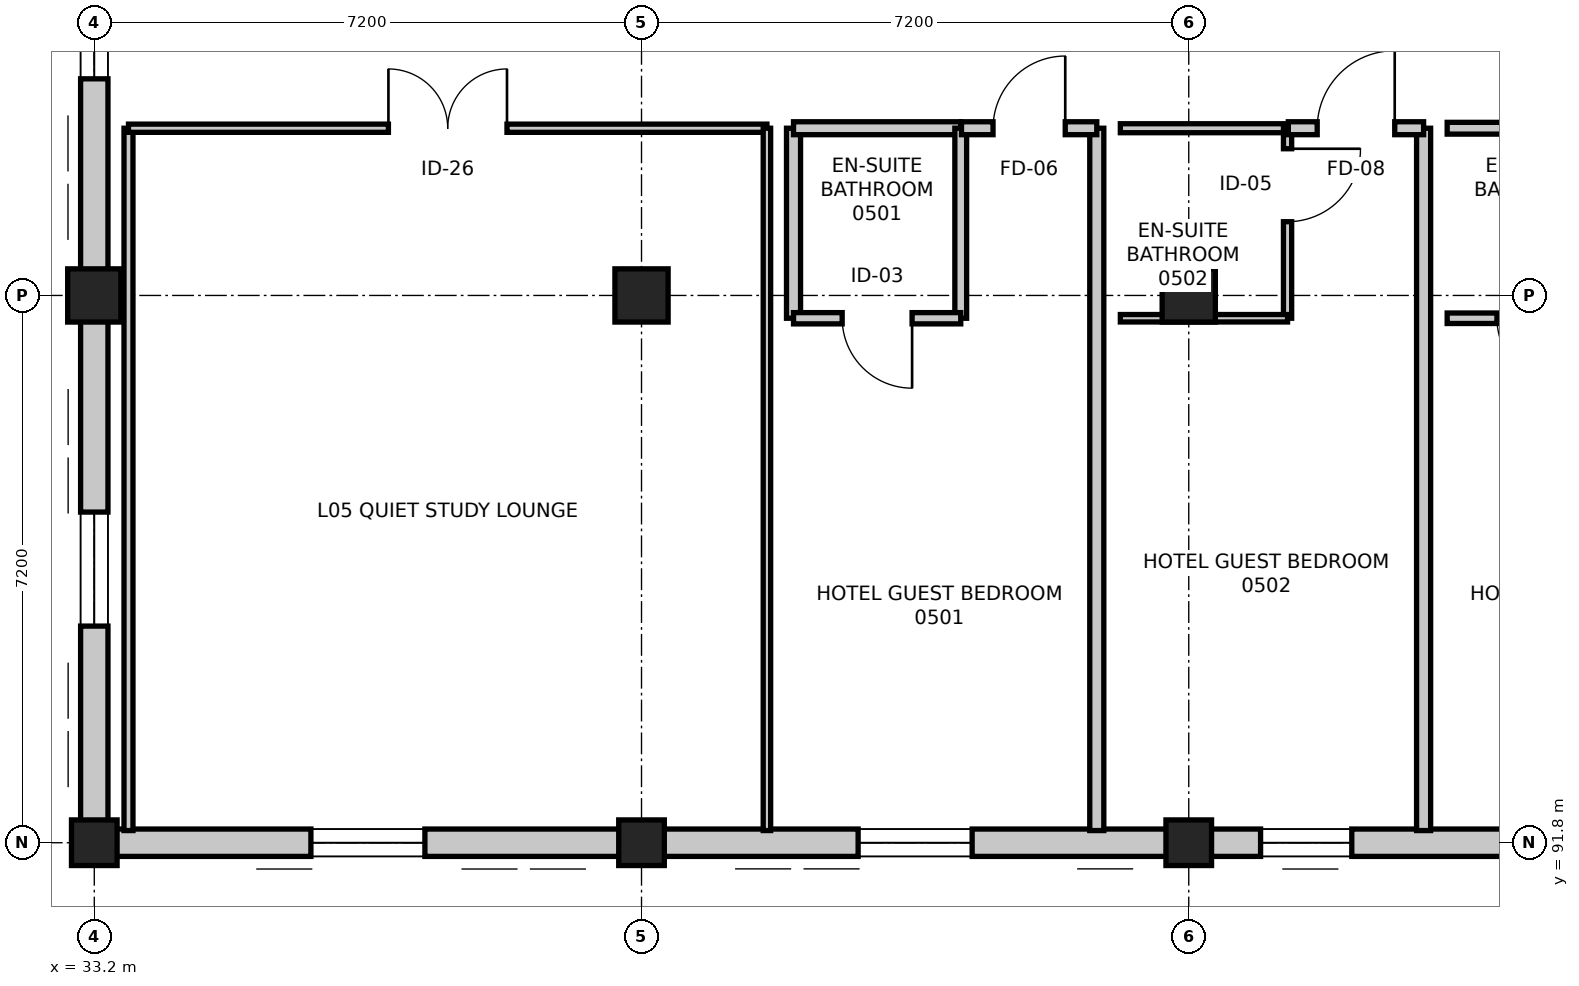
"""IFC4 building model, lengths in metres.
Left out: names, types, materials, properties, quantities, classifications, styles, units other than length and angle.
Written with IfcOpenShell. Run it as: python <this file> out.ifc"""

import sys

from ifc_helpers import new_model, si_unit, direction, frame, frame_2d, origin, origin_2d, place, context, subcontext, project, spatial, rectangle, extrude, element, fill, save


model = new_model("IFC4")
c1 = context("Model", 3, precision=1e-05, world=origin(), true_north=direction((0.0, 1.0)))
c2 = subcontext(c1, "Body", "Model", "MODEL_VIEW")
j1 = project(units=[si_unit("LENGTHUNIT", "METRE"), si_unit("PLANEANGLEUNIT", "RADIAN")], contexts=[c1])
p1 = place(None, origin())
s1 = spatial("IfcSite", under=j1, at=p1, CompositionType="ELEMENT")
p2 = place(p1, origin())
s2 = spatial("IfcBuilding", under=s1, at=p2, CompositionType="ELEMENT")
p3 = place(p2, frame((0.0, 0.0, 22.8)))
s3 = spatial("IfcBuildingStorey", under=s2, at=p3, CompositionType="ELEMENT", Elevation=22.8)
p4 = place(p3, frame((33.2, 91.8, 0.0), z_axis=(0.0, 0.0, 1.0), x_axis=(1.0, 0.0, 0.0)))
e1 = element("IfcColumn", 1, at=p4, inside=s3, PredefinedType="COLUMN", context=c2, shape_type="SweptSolid", body=[
    extrude(rectangle(XDim=0.6, YDim=0.6, at=origin_2d()), origin(), (0.0, 0.0, 1.0), 3.6),
])
p5 = place(p3, frame((33.2, 99.0, 0.0), z_axis=(0.0, 0.0, 1.0), x_axis=(1.0, 0.0, 0.0)))
e2 = element("IfcColumn", 2, at=p5, inside=s3, PredefinedType="COLUMN", context=c2, shape_type="SweptSolid", body=[
    extrude(rectangle(XDim=0.7, YDim=0.7, at=origin_2d()), origin(), (0.0, 0.0, 1.0), 3.6),
])
p6 = place(p3, frame((40.4, 91.8, 0.0), z_axis=(0.0, 0.0, 1.0), x_axis=(1.0, 0.0, 0.0)))
e3 = element("IfcColumn", 3, at=p6, inside=s3, PredefinedType="COLUMN", context=c2, shape_type="SweptSolid", body=[
    extrude(rectangle(XDim=0.6, YDim=0.6, at=origin_2d()), origin(), (0.0, 0.0, 1.0), 3.6),
])
p7 = place(p3, frame((40.4, 99.0, 0.0), z_axis=(0.0, 0.0, 1.0), x_axis=(1.0, 0.0, 0.0)))
e4 = element("IfcColumn", 4, at=p7, inside=s3, PredefinedType="COLUMN", context=c2, shape_type="SweptSolid", body=[
    extrude(rectangle(XDim=0.7, YDim=0.7, at=origin_2d()), origin(), (0.0, 0.0, 1.0), 3.6),
])
p8 = place(p3, frame((47.6, 91.8, 0.0), z_axis=(0.0, 0.0, 1.0), x_axis=(1.0, 0.0, 0.0)))
e5 = element("IfcColumn", 5, at=p8, inside=s3, PredefinedType="COLUMN", context=c2, shape_type="SweptSolid", body=[
    extrude(rectangle(XDim=0.6, YDim=0.6, at=origin_2d()), origin(), (0.0, 0.0, 1.0), 3.6),
])
p9 = place(p3, frame((47.6, 99.0, 0.0), z_axis=(0.0, 0.0, 1.0), x_axis=(1.0, 0.0, 0.0)))
e6 = element("IfcColumn", 6, at=p9, inside=s3, PredefinedType="COLUMN", context=c2, shape_type="SweptSolid", body=[
    extrude(rectangle(XDim=0.7, YDim=0.7, at=origin_2d()), origin(), (0.0, 0.0, 1.0), 3.6),
])
p10 = place(p3, frame((54.8, 91.8, 0.0), z_axis=(0.0, 0.0, 1.0), x_axis=(-1.0, 0.0, 0.0)))
e7 = element("IfcWall", 7, at=p10, inside=s3, PredefinedType="STANDARD", context=c2, shape_type="SweptSolid", body=[
    extrude(rectangle(XDim=7.2, YDim=0.36, at=frame_2d((3.6, 0.0))), origin(), (0.0, 0.0, 1.0), 2.735),
])
p11 = place(p10, frame((1.455, 0.0, 0.75)))
e8 = element("IfcOpeningElement", 8, at=p11, cuts=e7, PredefinedType="OPENING", context=c2, shape_type="SweptSolid", body=[
    extrude(rectangle(XDim=1.2, YDim=1.5, at=frame_2d((0.6, 0.75))), frame((0.0, 0.19, 0.0), z_axis=(0.0, -1.0, 0.0), x_axis=(1.0, 0.0, 0.0)), (0.0, 0.0, 1.0), 0.38),
])
p12 = place(p10, frame((5.055, 0.0, 0.75)))
e9 = element("IfcOpeningElement", 9, at=p12, cuts=e7, PredefinedType="OPENING", context=c2, shape_type="SweptSolid", body=[
    extrude(rectangle(XDim=1.2, YDim=1.5, at=frame_2d((0.6, 0.75))), frame((0.0, 0.19, 0.0), z_axis=(0.0, -1.0, 0.0), x_axis=(1.0, 0.0, 0.0)), (0.0, 0.0, 1.0), 0.38),
])
p13 = place(p3, frame((47.6, 91.8, 0.0), z_axis=(0.0, 0.0, 1.0), x_axis=(-1.0, 0.0, 0.0)))
e10 = element("IfcWall", 10, at=p13, inside=s3, PredefinedType="STANDARD", context=c2, shape_type="SweptSolid", body=[
    extrude(rectangle(XDim=7.2, YDim=0.36, at=frame_2d((3.6, 0.0))), origin(), (0.0, 0.0, 1.0), 2.735),
])
p14 = place(p13, frame((2.85, 0.0, 0.75)))
e11 = element("IfcOpeningElement", 11, at=p14, cuts=e10, PredefinedType="OPENING", context=c2, shape_type="SweptSolid", body=[
    extrude(rectangle(XDim=1.5, YDim=1.5, at=frame_2d((0.75, 0.75))), frame((0.0, 0.19, 0.0), z_axis=(0.0, -1.0, 0.0), x_axis=(1.0, 0.0, 0.0)), (0.0, 0.0, 1.0), 0.38),
])
p15 = place(p3, frame((40.4, 91.8, 0.0), z_axis=(0.0, 0.0, 1.0), x_axis=(-1.0, 0.0, 0.0)))
e12 = element("IfcWall", 12, at=p15, inside=s3, PredefinedType="STANDARD", context=c2, shape_type="SweptSolid", body=[
    extrude(rectangle(XDim=7.2, YDim=0.36, at=frame_2d((3.6, 0.0))), origin(), (0.0, 0.0, 1.0), 2.735),
])
p16 = place(p15, frame((2.85, 0.0, 0.75)))
e13 = element("IfcOpeningElement", 13, at=p16, cuts=e12, PredefinedType="OPENING", context=c2, shape_type="SweptSolid", body=[
    extrude(rectangle(XDim=1.5, YDim=1.5, at=frame_2d((0.75, 0.75))), frame((0.0, 0.19, 0.0), z_axis=(0.0, -1.0, 0.0), x_axis=(1.0, 0.0, 0.0)), (0.0, 0.0, 1.0), 0.38),
])
p17 = place(p3, frame((33.2, 91.8, 0.0), z_axis=(0.0, 0.0, 1.0), x_axis=(0.0, 1.0, 0.0)))
e14 = element("IfcWall", 14, at=p17, inside=s3, PredefinedType="STANDARD", context=c2, shape_type="SweptSolid", body=[
    extrude(rectangle(XDim=7.2, YDim=0.36, at=frame_2d((3.6, 0.0))), origin(), (0.0, 0.0, 1.0), 2.685),
])
p18 = place(p17, frame((2.85, 0.0, 0.75)))
e15 = element("IfcOpeningElement", 15, at=p18, cuts=e14, PredefinedType="OPENING", context=c2, shape_type="SweptSolid", body=[
    extrude(rectangle(XDim=1.5, YDim=1.5, at=frame_2d((0.75, 0.75))), frame((0.0, 0.19, 0.0), z_axis=(0.0, -1.0, 0.0), x_axis=(1.0, 0.0, 0.0)), (0.0, 0.0, 1.0), 0.38),
])
p19 = place(p3, frame((33.2, 99.0, 0.0), z_axis=(0.0, 0.0, 1.0), x_axis=(0.0, 1.0, 0.0)))
e16 = element("IfcWall", 16, at=p19, inside=s3, PredefinedType="STANDARD", context=c2, shape_type="SweptSolid", body=[
    extrude(rectangle(XDim=7.2, YDim=0.36, at=frame_2d((3.6, 0.0))), origin(), (0.0, 0.0, 1.0), 2.685),
])
p20 = place(p19, frame((2.85, 0.0, 0.75)))
e17 = element("IfcOpeningElement", 17, at=p20, cuts=e16, PredefinedType="OPENING", context=c2, shape_type="SweptSolid", body=[
    extrude(rectangle(XDim=1.5, YDim=1.5, at=frame_2d((0.75, 0.75))), frame((0.0, 0.19, 0.0), z_axis=(0.0, -1.0, 0.0), x_axis=(1.0, 0.0, 0.0)), (0.0, 0.0, 1.0), 0.38),
])
p21 = place(p3, frame((33.65, 91.96, 0.0), z_axis=(0.0, 0.0, 1.0), x_axis=(0.0, 1.0, 0.0)))
e18 = element("IfcWall", 18, at=p21, inside=s3, PredefinedType="PARTITIONING", context=c2, shape_type="SweptSolid", body=[
    extrude(rectangle(XDim=9.24, YDim=0.118, at=frame_2d((4.62, 0.0))), origin(), (0.0, 0.0, 1.0), 2.735),
])
p22 = place(p3, frame((33.65, 101.2, 0.0), z_axis=(0.0, 0.0, 1.0), x_axis=(1.0, 0.0, 0.0)))
e19 = element("IfcWall", 19, at=p22, inside=s3, PredefinedType="PARTITIONING", context=c2, shape_type="SweptSolid", body=[
    extrude(rectangle(XDim=8.4, YDim=0.108, at=frame_2d((4.2, 0.0))), origin(), (0.0, 0.0, 1.0), 2.685),
])
p23 = place(p22, frame((3.42, 0.0, 0.0)))
e20 = element("IfcOpeningElement", 20, at=p23, cuts=e19, PredefinedType="OPENING", context=c2, shape_type="SweptSolid", body=[
    extrude(rectangle(XDim=1.56, YDim=2.26, at=frame_2d((0.78, 1.13))), frame((0.0, 0.064, 0.0), z_axis=(0.0, -1.0, 0.0), x_axis=(1.0, 0.0, 0.0)), (0.0, 0.0, 1.0), 0.128),
])
p24 = place(p3, frame((42.05, 101.2, 0.0), z_axis=(0.0, 0.0, 1.0), x_axis=(0.0, -1.0, 0.0)))
e21 = element("IfcWall", 21, at=p24, inside=s3, PredefinedType="PARTITIONING", context=c2, shape_type="SweptSolid", body=[
    extrude(rectangle(XDim=9.24, YDim=0.098, at=frame_2d((4.62, 0.0))), origin(), (0.0, 0.0, 1.0), 2.735),
])
p25 = place(p3, frame((42.4, 98.7, 0.0), z_axis=(0.0, 0.0, 1.0), x_axis=(0.0, 1.0, 0.0)))
e22 = element("IfcWall", 22, at=p25, inside=s3, PredefinedType="PARTITIONING", context=c2, shape_type="SweptSolid", body=[
    extrude(rectangle(XDim=2.5, YDim=0.185, at=frame_2d((1.25, 0.0))), origin(), (0.0, 0.0, 1.0), 2.735),
])
p26 = place(p3, frame((42.4, 101.2, 0.0), z_axis=(0.0, 0.0, 1.0), x_axis=(1.0, 0.0, 0.0)))
e23 = element("IfcWall", 23, at=p26, inside=s3, PredefinedType="PARTITIONING", context=c2, shape_type="SweptSolid", body=[
    extrude(rectangle(XDim=2.2, YDim=0.17, at=frame_2d((1.1, 0.0))), origin(), (0.0, 0.0, 1.0), 3.35),
])
p27 = place(p3, frame((44.6, 101.2, 0.0), z_axis=(0.0, 0.0, 1.0), x_axis=(0.0, -1.0, 0.0)))
e24 = element("IfcWall", 24, at=p27, inside=s3, PredefinedType="PARTITIONING", context=c2, shape_type="SweptSolid", body=[
    extrude(rectangle(XDim=2.5, YDim=0.155, at=frame_2d((1.25, 0.0))), origin(), (0.0, 0.0, 1.0), 2.735),
])
p28 = place(p3, frame((44.6, 98.7, 0.0), z_axis=(0.0, 0.0, 1.0), x_axis=(-1.0, 0.0, 0.0)))
e25 = element("IfcWall", 25, at=p28, inside=s3, PredefinedType="PARTITIONING", context=c2, shape_type="SweptSolid", body=[
    extrude(rectangle(XDim=2.2, YDim=0.148, at=frame_2d((1.1, 0.0))), origin(), (0.0, 0.0, 1.0), 3.35),
])
p29 = place(p28, frame((0.64, 0.0, 0.0)))
e26 = element("IfcOpeningElement", 26, at=p29, cuts=e25, PredefinedType="OPENING", context=c2, shape_type="SweptSolid", body=[
    extrude(rectangle(XDim=0.92, YDim=2.1, at=frame_2d((0.46, 1.05))), frame((0.0, 0.084, 0.0), z_axis=(0.0, -1.0, 0.0), x_axis=(1.0, 0.0, 0.0)), (0.0, 0.0, 1.0), 0.168),
])
p30 = place(p3, frame((46.39, 101.2, 0.0), z_axis=(0.0, 0.0, 1.0), x_axis=(0.0, -1.0, 0.0)))
e27 = element("IfcWall", 27, at=p30, inside=s3, PredefinedType="PARTITIONING", context=c2, shape_type="SweptSolid", body=[
    extrude(rectangle(XDim=9.24, YDim=0.185, at=frame_2d((4.62, 0.0))), origin(), (0.0, 0.0, 1.0), 2.735),
])
p31 = place(p3, frame((44.61, 101.2, 0.0), z_axis=(0.0, 0.0, 1.0), x_axis=(1.0, 0.0, 0.0)))
e28 = element("IfcWall", 28, at=p31, inside=s3, PredefinedType="PARTITIONING", context=c2, shape_type="SweptSolid", body=[
    extrude(rectangle(XDim=1.78, YDim=0.17, at=frame_2d((0.89, 0.0))), origin(), (0.0, 0.0, 1.0), 3.35),
])
p32 = place(p31, frame((0.415, 0.0, 0.0)))
e29 = element("IfcOpeningElement", 29, at=p32, cuts=e28, PredefinedType="OPENING", context=c2, shape_type="SweptSolid", body=[
    extrude(rectangle(XDim=0.95, YDim=2.1, at=frame_2d((0.475, 1.05))), frame((0.0, 0.095, 0.0), z_axis=(0.0, -1.0, 0.0), x_axis=(1.0, 0.0, 0.0)), (0.0, 0.0, 1.0), 0.19),
])
p33 = place(p3, frame((46.7, 101.2, 0.0), z_axis=(0.0, 0.0, 1.0), x_axis=(1.0, 0.0, 0.0)))
e30 = element("IfcWall", 30, at=p33, inside=s3, PredefinedType="PARTITIONING", context=c2, shape_type="SweptSolid", body=[
    extrude(rectangle(XDim=2.2, YDim=0.118, at=frame_2d((1.1, 0.0))), origin(), (0.0, 0.0, 1.0), 2.685),
])
p34 = place(p3, frame((48.9, 101.2, 0.0), z_axis=(0.0, 0.0, 1.0), x_axis=(0.0, -1.0, 0.0)))
e31 = element("IfcWall", 31, at=p34, inside=s3, PredefinedType="PARTITIONING", context=c2, shape_type="SweptSolid", body=[
    extrude(rectangle(XDim=2.5, YDim=0.108, at=frame_2d((1.25, 0.0))), origin(), (0.0, 0.0, 1.0), 2.735),
])
p35 = place(p34, frame((0.27, 0.0, 0.0)))
e32 = element("IfcOpeningElement", 32, at=p35, cuts=e31, PredefinedType="OPENING", context=c2, shape_type="SweptSolid", body=[
    extrude(rectangle(XDim=0.96, YDim=2.14, at=frame_2d((0.48, 1.07))), frame((0.0, 0.064, 0.0), z_axis=(0.0, -1.0, 0.0), x_axis=(1.0, 0.0, 0.0)), (0.0, 0.0, 1.0), 0.128),
])
p36 = place(p3, frame((48.9, 98.7, 0.0), z_axis=(0.0, 0.0, 1.0), x_axis=(-1.0, 0.0, 0.0)))
e33 = element("IfcWall", 33, at=p36, inside=s3, PredefinedType="PARTITIONING", context=c2, shape_type="SweptSolid", body=[
    extrude(rectangle(XDim=2.2, YDim=0.098, at=frame_2d((1.1, 0.0))), origin(), (0.0, 0.0, 1.0), 2.685),
])
p37 = place(p3, frame((50.69, 101.2, 0.0), z_axis=(0.0, 0.0, 1.0), x_axis=(0.0, -1.0, 0.0)))
e34 = element("IfcWall", 34, at=p37, inside=s3, PredefinedType="PARTITIONING", context=c2, shape_type="SweptSolid", body=[
    extrude(rectangle(XDim=9.24, YDim=0.185, at=frame_2d((4.62, 0.0))), origin(), (0.0, 0.0, 1.0), 2.735),
])
p38 = place(p3, frame((48.91, 101.2, 0.0), z_axis=(0.0, 0.0, 1.0), x_axis=(1.0, 0.0, 0.0)))
e35 = element("IfcWall", 35, at=p38, inside=s3, PredefinedType="PARTITIONING", context=c2, shape_type="SweptSolid", body=[
    extrude(rectangle(XDim=1.78, YDim=0.17, at=frame_2d((0.89, 0.0))), origin(), (0.0, 0.0, 1.0), 3.35),
])
p39 = place(p38, frame((0.38, 0.0, 0.0)))
e36 = element("IfcOpeningElement", 36, at=p39, cuts=e35, PredefinedType="OPENING", context=c2, shape_type="SweptSolid", body=[
    extrude(rectangle(XDim=1.02, YDim=2.15, at=frame_2d((0.51, 1.075))), frame((0.0, 0.095, 0.0), z_axis=(0.0, -1.0, 0.0), x_axis=(1.0, 0.0, 0.0)), (0.0, 0.0, 1.0), 0.19),
])
p40 = place(p3, frame((51.0, 101.2, 0.0), z_axis=(0.0, 0.0, 1.0), x_axis=(1.0, 0.0, 0.0)))
e37 = element("IfcWall", 37, at=p40, inside=s3, PredefinedType="PARTITIONING", context=c2, shape_type="SweptSolid", body=[
    extrude(rectangle(XDim=2.2, YDim=0.155, at=frame_2d((1.1, 0.0))), origin(), (0.0, 0.0, 1.0), 3.35),
])
p41 = place(p3, frame((53.2, 98.7, 0.0), z_axis=(0.0, 0.0, 1.0), x_axis=(-1.0, 0.0, 0.0)))
e38 = element("IfcWall", 38, at=p41, inside=s3, PredefinedType="PARTITIONING", context=c2, shape_type="SweptSolid", body=[
    extrude(rectangle(XDim=2.2, YDim=0.138, at=frame_2d((1.1, 0.0))), origin(), (0.0, 0.0, 1.0), 3.35),
])
p42 = place(p41, frame((0.655, 0.0, 0.0)))
e39 = element("IfcOpeningElement", 39, at=p42, cuts=e38, PredefinedType="OPENING", context=c2, shape_type="SweptSolid", body=[
    extrude(rectangle(XDim=0.89, YDim=2.09, at=frame_2d((0.445, 1.045))), frame((0.0, 0.079, 0.0), z_axis=(0.0, -1.0, 0.0), x_axis=(1.0, 0.0, 0.0)), (0.0, 0.0, 1.0), 0.158),
])
p43 = place(p14, origin())
e40 = element("IfcWindow", 40, at=p43, inside=s3, PartitioningType="SINGLE_PANEL", PredefinedType="WINDOW", context=c2, shape_type="SweptSolid", body=[
    extrude(rectangle(XDim=1.5, YDim=1.5, at=frame_2d((0.75, 0.75))), frame((0.0, 0.03, 0.0), z_axis=(0.0, -1.0, 0.0), x_axis=(1.0, 0.0, 0.0)), (0.0, 0.0, 1.0), 0.06),
])
fill(e11, e40)
p44 = place(p16, origin())
e41 = element("IfcWindow", 41, at=p44, inside=s3, PartitioningType="SINGLE_PANEL", PredefinedType="WINDOW", context=c2, shape_type="SweptSolid", body=[
    extrude(rectangle(XDim=1.5, YDim=1.5, at=frame_2d((0.75, 0.75))), frame((0.0, 0.03, 0.0), z_axis=(0.0, -1.0, 0.0), x_axis=(1.0, 0.0, 0.0)), (0.0, 0.0, 1.0), 0.06),
])
fill(e13, e41)
p45 = place(p18, origin())
e42 = element("IfcWindow", 42, at=p45, inside=s3, PartitioningType="SINGLE_PANEL", PredefinedType="WINDOW", context=c2, shape_type="SweptSolid", body=[
    extrude(rectangle(XDim=1.5, YDim=1.5, at=frame_2d((0.75, 0.75))), frame((0.0, 0.03, 0.0), z_axis=(0.0, -1.0, 0.0), x_axis=(1.0, 0.0, 0.0)), (0.0, 0.0, 1.0), 0.06),
])
fill(e15, e42)
p46 = place(p20, origin())
e43 = element("IfcWindow", 43, at=p46, inside=s3, PartitioningType="SINGLE_PANEL", PredefinedType="WINDOW", context=c2, shape_type="SweptSolid", body=[
    extrude(rectangle(XDim=1.5, YDim=1.5, at=frame_2d((0.75, 0.75))), frame((0.0, 0.03, 0.0), z_axis=(0.0, -1.0, 0.0), x_axis=(1.0, 0.0, 0.0)), (0.0, 0.0, 1.0), 0.06),
])
fill(e17, e43)
p47 = place(p23, origin())
e44 = element("IfcDoor", 44, at=p47, inside=s3, OperationType="DOUBLE_DOOR_SINGLE_SWING", PredefinedType="DOOR", context=c2, shape_type="SweptSolid", body=[
    extrude(rectangle(XDim=1.56, YDim=2.26, at=frame_2d((0.78, 1.13))), frame((0.0, 0.025, 0.0), z_axis=(0.0, -1.0, 0.0), x_axis=(1.0, 0.0, 0.0)), (0.0, 0.0, 1.0), 0.05),
])
fill(e20, e44)
p48 = place(p29, origin())
e45 = element("IfcDoor", 45, at=p48, inside=s3, OperationType="SINGLE_SWING_LEFT", PredefinedType="DOOR", context=c2, shape_type="SweptSolid", body=[
    extrude(rectangle(XDim=0.92, YDim=2.1, at=frame_2d((0.46, 1.05))), frame((0.0, 0.025, 0.0), z_axis=(0.0, -1.0, 0.0), x_axis=(1.0, 0.0, 0.0)), (0.0, 0.0, 1.0), 0.05),
])
fill(e26, e45)
p49 = place(p32, origin())
e46 = element("IfcDoor", 46, at=p49, inside=s3, OperationType="SINGLE_SWING_RIGHT", PredefinedType="DOOR", context=c2, shape_type="SweptSolid", body=[
    extrude(rectangle(XDim=0.95, YDim=2.1, at=frame_2d((0.475, 1.05))), frame((0.0, 0.025, 0.0), z_axis=(0.0, -1.0, 0.0), x_axis=(1.0, 0.0, 0.0)), (0.0, 0.0, 1.0), 0.05),
])
fill(e29, e46)
p50 = place(p35, origin())
e47 = element("IfcDoor", 47, at=p50, inside=s3, OperationType="SINGLE_SWING_LEFT", PredefinedType="DOOR", context=c2, shape_type="SweptSolid", body=[
    extrude(rectangle(XDim=0.96, YDim=2.14, at=frame_2d((0.48, 1.07))), frame((0.0, 0.025, 0.0), z_axis=(0.0, -1.0, 0.0), x_axis=(1.0, 0.0, 0.0)), (0.0, 0.0, 1.0), 0.05),
])
fill(e32, e47)
p51 = place(p39, origin())
e48 = element("IfcDoor", 48, at=p51, inside=s3, OperationType="SINGLE_SWING_RIGHT", PredefinedType="DOOR", context=c2, shape_type="SweptSolid", body=[
    extrude(rectangle(XDim=1.02, YDim=2.15, at=frame_2d((0.51, 1.075))), frame((0.0, 0.025, 0.0), z_axis=(0.0, -1.0, 0.0), x_axis=(1.0, 0.0, 0.0)), (0.0, 0.0, 1.0), 0.05),
])
fill(e36, e48)
p52 = place(p42, origin())
e49 = element("IfcDoor", 49, at=p52, inside=s3, OperationType="SINGLE_SWING_LEFT", PredefinedType="DOOR", context=c2, shape_type="SweptSolid", body=[
    extrude(rectangle(XDim=0.89, YDim=2.09, at=frame_2d((0.445, 1.045))), frame((0.0, 0.025, 0.0), z_axis=(0.0, -1.0, 0.0), x_axis=(1.0, 0.0, 0.0)), (0.0, 0.0, 1.0), 0.05),
])
fill(e39, e49)
p53 = place(p12, origin())
e50 = element("IfcWindow", 50, at=p53, inside=s3, PartitioningType="SINGLE_PANEL", PredefinedType="WINDOW", context=c2, shape_type="SweptSolid", body=[
    extrude(rectangle(XDim=1.2, YDim=1.5, at=frame_2d((0.6, 0.75))), frame((0.0, 0.03, 0.0), z_axis=(0.0, -1.0, 0.0), x_axis=(1.0, 0.0, 0.0)), (0.0, 0.0, 1.0), 0.06),
])
fill(e9, e50)
save(model, sys.argv[1])
